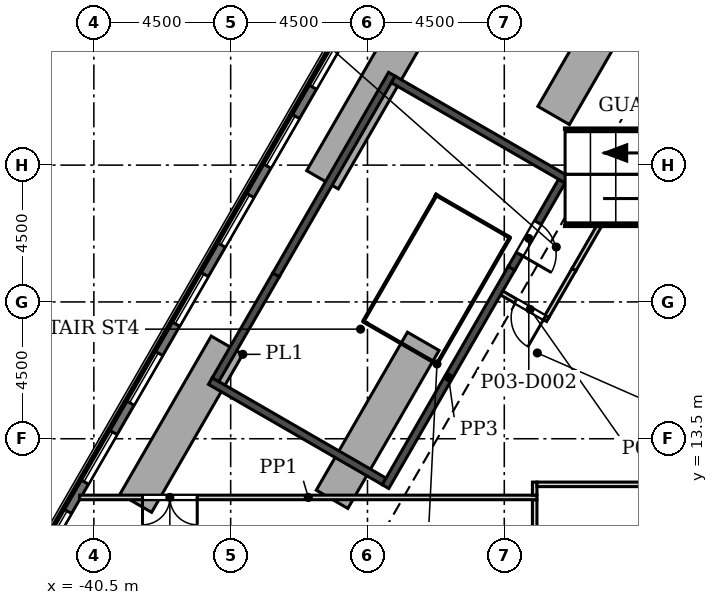
"""IFC4 building model, lengths in metres.
Left out: names, types, materials, properties, quantities, classifications, styles, units other than length and angle.
Written with IfcOpenShell. Run it as: python <this file> out.ifc"""

import sys

from ifc_helpers import new_model, si_unit, direction, frame, frame_2d, origin, place, context, subcontext, project, spatial, polyline, rectangle, outline, extrude, element, fill, save


model = new_model("IFC4")
c1 = context("Model", 3, precision=1e-05, world=origin(), true_north=direction((0.0, 1.0)))
c2 = subcontext(c1, "Body", "Model", "MODEL_VIEW")
j1 = project(units=[si_unit("LENGTHUNIT", "METRE"), si_unit("PLANEANGLEUNIT", "RADIAN")], contexts=[c1])
p1 = place(None, origin())
s1 = spatial("IfcSite", under=j1, at=p1, CompositionType="ELEMENT")
p2 = place(p1, origin())
s2 = spatial("IfcBuilding", under=s1, at=p2, CompositionType="ELEMENT")
p3 = place(p2, frame((0.0, 0.0, 20.0)))
s3 = spatial("IfcBuildingStorey", under=s2, at=p3, CompositionType="ELEMENT", Elevation=20.0)
p4 = place(p3, frame((-4.853, 74.393, 0.0), z_axis=(0.0, 0.0, 1.0), x_axis=(-0.49999894854, -0.866026010844, 0.0)))
e1 = element("IfcWall", 1, at=p4, inside=s3, PredefinedType="SOLIDWALL", context=c2, shape_type="SweptSolid", body=[
    extrude(rectangle(XDim=76.0, YDim=0.34, at=frame_2d((38.0, 0.0))), origin(), (0.0, 0.0, 1.0), 3.0),
])
p5 = place(p4, frame((1.058, 0.0, 0.9)))
e2 = element("IfcOpeningElement", 2, at=p5, cuts=e1, PredefinedType="OPENING", context=c2, shape_type="SweptSolid", body=[
    extrude(rectangle(XDim=1.885, YDim=1.9, at=frame_2d((0.942, 0.95))), frame((0.0, 0.18, 0.0), z_axis=(0.0, -1.0, 0.0), x_axis=(1.0, 0.0, 0.0)), (0.0, 0.0, 1.0), 0.36),
])
p6 = place(p4, frame((4.058, 0.0, 0.9)))
e3 = element("IfcOpeningElement", 3, at=p6, cuts=e1, PredefinedType="OPENING", context=c2, shape_type="SweptSolid", body=[
    extrude(rectangle(XDim=1.885, YDim=1.9, at=frame_2d((0.942, 0.95))), frame((0.0, 0.18, 0.0), z_axis=(0.0, -1.0, 0.0), x_axis=(1.0, 0.0, 0.0)), (0.0, 0.0, 1.0), 0.36),
])
p7 = place(p4, frame((7.058, 0.0, 0.9)))
e4 = element("IfcOpeningElement", 4, at=p7, cuts=e1, PredefinedType="OPENING", context=c2, shape_type="SweptSolid", body=[
    extrude(rectangle(XDim=1.885, YDim=1.9, at=frame_2d((0.942, 0.95))), frame((0.0, 0.18, 0.0), z_axis=(0.0, -1.0, 0.0), x_axis=(1.0, 0.0, 0.0)), (0.0, 0.0, 1.0), 0.36),
])
p8 = place(p4, frame((10.058, 0.0, 0.9)))
e5 = element("IfcOpeningElement", 5, at=p8, cuts=e1, PredefinedType="OPENING", context=c2, shape_type="SweptSolid", body=[
    extrude(rectangle(XDim=1.885, YDim=1.9, at=frame_2d((0.942, 0.95))), frame((0.0, 0.18, 0.0), z_axis=(0.0, -1.0, 0.0), x_axis=(1.0, 0.0, 0.0)), (0.0, 0.0, 1.0), 0.36),
])
p9 = place(p4, frame((13.058, 0.0, 0.9)))
e6 = element("IfcOpeningElement", 6, at=p9, cuts=e1, PredefinedType="OPENING", context=c2, shape_type="SweptSolid", body=[
    extrude(rectangle(XDim=1.885, YDim=1.9, at=frame_2d((0.942, 0.95))), frame((0.0, 0.18, 0.0), z_axis=(0.0, -1.0, 0.0), x_axis=(1.0, 0.0, 0.0)), (0.0, 0.0, 1.0), 0.36),
])
p10 = place(p4, frame((16.058, 0.0, 0.9)))
e7 = element("IfcOpeningElement", 7, at=p10, cuts=e1, PredefinedType="OPENING", context=c2, shape_type="SweptSolid", body=[
    extrude(rectangle(XDim=1.885, YDim=1.9, at=frame_2d((0.942, 0.95))), frame((0.0, 0.18, 0.0), z_axis=(0.0, -1.0, 0.0), x_axis=(1.0, 0.0, 0.0)), (0.0, 0.0, 1.0), 0.36),
])
p11 = place(p4, frame((19.058, 0.0, 0.9)))
e8 = element("IfcOpeningElement", 8, at=p11, cuts=e1, PredefinedType="OPENING", context=c2, shape_type="SweptSolid", body=[
    extrude(rectangle(XDim=1.885, YDim=1.9, at=frame_2d((0.942, 0.95))), frame((0.0, 0.18, 0.0), z_axis=(0.0, -1.0, 0.0), x_axis=(1.0, 0.0, 0.0)), (0.0, 0.0, 1.0), 0.36),
])
p12 = place(p4, frame((22.058, 0.0, 0.9)))
e9 = element("IfcOpeningElement", 9, at=p12, cuts=e1, PredefinedType="OPENING", context=c2, shape_type="SweptSolid", body=[
    extrude(rectangle(XDim=1.885, YDim=1.9, at=frame_2d((0.942, 0.95))), frame((0.0, 0.18, 0.0), z_axis=(0.0, -1.0, 0.0), x_axis=(1.0, 0.0, 0.0)), (0.0, 0.0, 1.0), 0.36),
])
p13 = place(p4, frame((25.058, 0.0, 0.9)))
e10 = element("IfcOpeningElement", 10, at=p13, cuts=e1, PredefinedType="OPENING", context=c2, shape_type="SweptSolid", body=[
    extrude(rectangle(XDim=1.885, YDim=1.9, at=frame_2d((0.942, 0.95))), frame((0.0, 0.18, 0.0), z_axis=(0.0, -1.0, 0.0), x_axis=(1.0, 0.0, 0.0)), (0.0, 0.0, 1.0), 0.36),
])
p14 = place(p4, frame((28.058, 0.0, 0.9)))
e11 = element("IfcOpeningElement", 11, at=p14, cuts=e1, PredefinedType="OPENING", context=c2, shape_type="SweptSolid", body=[
    extrude(rectangle(XDim=1.885, YDim=1.9, at=frame_2d((0.942, 0.95))), frame((0.0, 0.18, 0.0), z_axis=(0.0, -1.0, 0.0), x_axis=(1.0, 0.0, 0.0)), (0.0, 0.0, 1.0), 0.36),
])
p15 = place(p4, frame((31.058, 0.0, 0.9)))
e12 = element("IfcOpeningElement", 12, at=p15, cuts=e1, PredefinedType="OPENING", context=c2, shape_type="SweptSolid", body=[
    extrude(rectangle(XDim=1.885, YDim=1.9, at=frame_2d((0.942, 0.95))), frame((0.0, 0.18, 0.0), z_axis=(0.0, -1.0, 0.0), x_axis=(1.0, 0.0, 0.0)), (0.0, 0.0, 1.0), 0.36),
])
p16 = place(p4, frame((34.058, 0.0, 0.9)))
e13 = element("IfcOpeningElement", 13, at=p16, cuts=e1, PredefinedType="OPENING", context=c2, shape_type="SweptSolid", body=[
    extrude(rectangle(XDim=1.885, YDim=1.9, at=frame_2d((0.942, 0.95))), frame((0.0, 0.18, 0.0), z_axis=(0.0, -1.0, 0.0), x_axis=(1.0, 0.0, 0.0)), (0.0, 0.0, 1.0), 0.36),
])
p17 = place(p4, frame((37.058, 0.0, 0.9)))
e14 = element("IfcOpeningElement", 14, at=p17, cuts=e1, PredefinedType="OPENING", context=c2, shape_type="SweptSolid", body=[
    extrude(rectangle(XDim=1.885, YDim=1.9, at=frame_2d((0.942, 0.95))), frame((0.0, 0.18, 0.0), z_axis=(0.0, -1.0, 0.0), x_axis=(1.0, 0.0, 0.0)), (0.0, 0.0, 1.0), 0.36),
])
p18 = place(p4, frame((40.058, 0.0, 0.9)))
e15 = element("IfcOpeningElement", 15, at=p18, cuts=e1, PredefinedType="OPENING", context=c2, shape_type="SweptSolid", body=[
    extrude(rectangle(XDim=1.885, YDim=1.9, at=frame_2d((0.942, 0.95))), frame((0.0, 0.18, 0.0), z_axis=(0.0, -1.0, 0.0), x_axis=(1.0, 0.0, 0.0)), (0.0, 0.0, 1.0), 0.36),
])
p19 = place(p4, frame((43.058, 0.0, 0.9)))
e16 = element("IfcOpeningElement", 16, at=p19, cuts=e1, PredefinedType="OPENING", context=c2, shape_type="SweptSolid", body=[
    extrude(rectangle(XDim=1.885, YDim=1.9, at=frame_2d((0.942, 0.95))), frame((0.0, 0.18, 0.0), z_axis=(0.0, -1.0, 0.0), x_axis=(1.0, 0.0, 0.0)), (0.0, 0.0, 1.0), 0.36),
])
p20 = place(p4, frame((46.058, 0.0, 0.9)))
e17 = element("IfcOpeningElement", 17, at=p20, cuts=e1, PredefinedType="OPENING", context=c2, shape_type="SweptSolid", body=[
    extrude(rectangle(XDim=1.885, YDim=1.9, at=frame_2d((0.942, 0.95))), frame((0.0, 0.18, 0.0), z_axis=(0.0, -1.0, 0.0), x_axis=(1.0, 0.0, 0.0)), (0.0, 0.0, 1.0), 0.36),
])
p21 = place(p4, frame((49.058, 0.0, 0.9)))
e18 = element("IfcOpeningElement", 18, at=p21, cuts=e1, PredefinedType="OPENING", context=c2, shape_type="SweptSolid", body=[
    extrude(rectangle(XDim=1.885, YDim=1.9, at=frame_2d((0.942, 0.95))), frame((0.0, 0.18, 0.0), z_axis=(0.0, -1.0, 0.0), x_axis=(1.0, 0.0, 0.0)), (0.0, 0.0, 1.0), 0.36),
])
p22 = place(p4, frame((52.058, 0.0, 0.9)))
e19 = element("IfcOpeningElement", 19, at=p22, cuts=e1, PredefinedType="OPENING", context=c2, shape_type="SweptSolid", body=[
    extrude(rectangle(XDim=1.885, YDim=1.9, at=frame_2d((0.942, 0.95))), frame((0.0, 0.18, 0.0), z_axis=(0.0, -1.0, 0.0), x_axis=(1.0, 0.0, 0.0)), (0.0, 0.0, 1.0), 0.36),
])
p23 = place(p4, frame((55.058, 0.0, 0.9)))
e20 = element("IfcOpeningElement", 20, at=p23, cuts=e1, PredefinedType="OPENING", context=c2, shape_type="SweptSolid", body=[
    extrude(rectangle(XDim=1.885, YDim=1.9, at=frame_2d((0.942, 0.95))), frame((0.0, 0.18, 0.0), z_axis=(0.0, -1.0, 0.0), x_axis=(1.0, 0.0, 0.0)), (0.0, 0.0, 1.0), 0.36),
])
p24 = place(p4, frame((58.058, 0.0, 0.9)))
e21 = element("IfcOpeningElement", 21, at=p24, cuts=e1, PredefinedType="OPENING", context=c2, shape_type="SweptSolid", body=[
    extrude(rectangle(XDim=1.885, YDim=1.9, at=frame_2d((0.942, 0.95))), frame((0.0, 0.18, 0.0), z_axis=(0.0, -1.0, 0.0), x_axis=(1.0, 0.0, 0.0)), (0.0, 0.0, 1.0), 0.36),
])
p25 = place(p4, frame((61.058, 0.0, 0.9)))
e22 = element("IfcOpeningElement", 22, at=p25, cuts=e1, PredefinedType="OPENING", context=c2, shape_type="SweptSolid", body=[
    extrude(rectangle(XDim=1.885, YDim=1.9, at=frame_2d((0.942, 0.95))), frame((0.0, 0.18, 0.0), z_axis=(0.0, -1.0, 0.0), x_axis=(1.0, 0.0, 0.0)), (0.0, 0.0, 1.0), 0.36),
])
p26 = place(p4, frame((64.058, 0.0, 0.9)))
e23 = element("IfcOpeningElement", 23, at=p26, cuts=e1, PredefinedType="OPENING", context=c2, shape_type="SweptSolid", body=[
    extrude(rectangle(XDim=1.885, YDim=1.9, at=frame_2d((0.942, 0.95))), frame((0.0, 0.18, 0.0), z_axis=(0.0, -1.0, 0.0), x_axis=(1.0, 0.0, 0.0)), (0.0, 0.0, 1.0), 0.36),
])
p27 = place(p4, frame((67.058, 0.0, 0.9)))
e24 = element("IfcOpeningElement", 24, at=p27, cuts=e1, PredefinedType="OPENING", context=c2, shape_type="SweptSolid", body=[
    extrude(rectangle(XDim=1.885, YDim=1.9, at=frame_2d((0.942, 0.95))), frame((0.0, 0.18, 0.0), z_axis=(0.0, -1.0, 0.0), x_axis=(1.0, 0.0, 0.0)), (0.0, 0.0, 1.0), 0.36),
])
p28 = place(p4, frame((70.058, 0.0, 0.9)))
e25 = element("IfcOpeningElement", 25, at=p28, cuts=e1, PredefinedType="OPENING", context=c2, shape_type="SweptSolid", body=[
    extrude(rectangle(XDim=1.885, YDim=1.9, at=frame_2d((0.942, 0.95))), frame((0.0, 0.18, 0.0), z_axis=(0.0, -1.0, 0.0), x_axis=(1.0, 0.0, 0.0)), (0.0, 0.0, 1.0), 0.36),
])
p29 = place(p4, frame((73.058, 0.0, 0.9)))
e26 = element("IfcOpeningElement", 26, at=p29, cuts=e1, PredefinedType="OPENING", context=c2, shape_type="SweptSolid", body=[
    extrude(rectangle(XDim=1.885, YDim=1.9, at=frame_2d((0.942, 0.95))), frame((0.0, 0.18, 0.0), z_axis=(0.0, -1.0, 0.0), x_axis=(1.0, 0.0, 0.0)), (0.0, 0.0, 1.0), 0.36),
])
p30 = place(p3, frame((0.0, 0.0, 5.0)))
e27 = element("IfcWall", 27, at=p30, inside=s3, PredefinedType="USERDEFINED", context=c2, shape_type="SweptSolid", body=[
    extrude(outline(polyline([(-39.64, 11.68), (-38.601, 11.08), (-35.601, 16.277), (-36.64, 16.876), (-39.64, 11.68)])), origin(), (0.0, 0.0, 1.0), 1.1),
])
p31 = place(p3, frame((0.0, 0.0, 5.0)))
e28 = element("IfcWall", 28, at=p31, inside=s3, PredefinedType="USERDEFINED", context=c2, shape_type="SweptSolid", body=[
    extrude(outline(polyline([(-33.499, 22.317), (-32.46, 21.717), (-29.46, 26.913), (-30.499, 27.513), (-33.499, 22.317)])), origin(), (0.0, 0.0, 1.0), 1.1),
])
p32 = place(p3, frame((0.0, 0.0, 5.0)))
e29 = element("IfcWall", 29, at=p32, inside=s3, PredefinedType="USERDEFINED", context=c2, shape_type="SweptSolid", body=[
    extrude(outline(polyline([(-21.857, 29.029), (-22.896, 29.629), (-25.896, 24.433), (-24.857, 23.833), (-21.857, 29.029)])), origin(), (0.0, 0.0, 1.0), 1.1),
])
p33 = place(p3, frame((0.0, 0.0, 5.0)))
e30 = element("IfcWall", 30, at=p33, inside=s3, PredefinedType="USERDEFINED", context=c2, shape_type="SweptSolid", body=[
    extrude(outline(polyline([(-29.146, 16.405), (-30.185, 17.004), (-33.185, 11.808), (-32.146, 11.208), (-29.146, 16.405)])), origin(), (0.0, 0.0, 1.0), 1.1),
])
p34 = place(p3, frame((-26.0, 11.495, 0.0), z_axis=(0.0, 0.0, 1.0), x_axis=(0.0, -1.0, 0.0)))
e31 = element("IfcWall", 31, at=p34, inside=s3, PredefinedType="PARTITIONING", context=c2, shape_type="SweptSolid", body=[
    extrude(rectangle(XDim=1.42, YDim=0.15, at=frame_2d((0.71, 0.0))), origin(), (0.0, 0.0, 1.0), 3.0),
])
p35 = place(p3, frame((-40.968, 11.57, 0.0), z_axis=(0.0, 0.0, 1.0), x_axis=(1.0, 0.0, 0.0)))
e32 = element("IfcWall", 32, at=p35, inside=s3, PredefinedType="PARTITIONING", context=c2, shape_type="SweptSolid", body=[
    extrude(rectangle(XDim=15.043, YDim=0.15, at=frame_2d((7.521, 0.0))), origin(), (0.0, 0.0, 1.0), 3.0),
])
p36 = place(p35, frame((2.068, 0.0, 0.0)))
e33 = element("IfcOpeningElement", 33, at=p36, cuts=e32, PredefinedType="OPENING", context=c2, shape_type="SweptSolid", body=[
    extrude(rectangle(XDim=1.8, YDim=2.1, at=frame_2d((0.9, 1.05))), frame((0.0, 0.085, 0.0), z_axis=(0.0, -1.0, 0.0), x_axis=(1.0, 0.0, 0.0)), (0.0, 0.0, 1.0), 0.17),
])
p37 = place(p3, frame((-26.0, 11.645, 0.0), z_axis=(0.0, 0.0, 1.0), x_axis=(0.0, 1.0, 0.0)))
e34 = element("IfcWall", 34, at=p37, inside=s3, PredefinedType="PARTITIONING", context=c2, shape_type="SweptSolid", body=[
    extrude(rectangle(XDim=0.43, YDim=0.15, at=frame_2d((0.215, 0.0))), origin(), (0.0, 0.0, 1.0), 3.0),
])
p38 = place(p3, frame((-25.925, 12.0, 0.0), z_axis=(0.0, 0.0, 1.0), x_axis=(1.0, 0.0, 0.0)))
e35 = element("IfcWall", 35, at=p38, inside=s3, PredefinedType="PARTITIONING", context=c2, shape_type="SweptSolid", body=[
    extrude(rectangle(XDim=12.512, YDim=0.15, at=frame_2d((6.256, 0.0))), origin(), (0.0, 0.0, 1.0), 3.0),
])
p39 = place(p38, frame((5.025, 0.0, 0.0)))
e36 = element("IfcOpeningElement", 36, at=p39, cuts=e35, PredefinedType="OPENING", context=c2, shape_type="SweptSolid", body=[
    extrude(rectangle(XDim=1.8, YDim=2.1, at=frame_2d((0.9, 1.05))), frame((0.0, 0.085, 0.0), z_axis=(0.0, -1.0, 0.0), x_axis=(1.0, 0.0, 0.0)), (0.0, 0.0, 1.0), 0.17),
])
p40 = place(p3, frame((-30.953, 12.097, 0.0), z_axis=(0.0, 0.0, 1.0), x_axis=(-0.866040211805, 0.499974350878, 0.0)))
e37 = element("IfcWall", 37, at=p40, inside=s3, PredefinedType="SOLIDWALL", context=c2, shape_type="SweptSolid", body=[
    extrude(rectangle(XDim=6.6, YDim=0.25, at=frame_2d((3.3, 0.0))), origin(), (0.0, 0.0, 1.0), 3.0),
])
p41 = place(p3, frame((-36.498, 15.443, 0.0), z_axis=(0.0, 0.0, 1.0), x_axis=(0.499989551455, 0.866031436171, 0.0)))
e38 = element("IfcWall", 38, at=p41, inside=s3, PredefinedType="SOLIDWALL", context=c2, shape_type="SweptSolid", body=[
    extrude(rectangle(XDim=3.982, YDim=0.25, at=frame_2d((1.991, 0.0))), origin(), (0.0, 0.0, 1.0), 3.0),
])
p42 = place(p3, frame((-25.571, 17.419, 0.0), z_axis=(0.0, 0.0, 1.0), x_axis=(-0.866046247233, 0.49996389635, 0.0)))
e39 = element("IfcWall", 39, at=p42, inside=s3, PredefinedType="PARTITIONING", context=c2, shape_type="SweptSolid", body=[
    extrude(rectangle(XDim=1.751, YDim=0.15, at=frame_2d((0.875, 0.0))), origin(), (0.0, 0.0, 1.0), 3.0),
])
p43 = place(p42, frame((0.12, 0.0, 0.0)))
e40 = element("IfcOpeningElement", 40, at=p43, cuts=e39, PredefinedType="OPENING", context=c2, shape_type="SweptSolid", body=[
    extrude(rectangle(XDim=1.1, YDim=2.1, at=frame_2d((0.55, 1.05))), frame((0.0, 0.085, 0.0), z_axis=(0.0, -1.0, 0.0), x_axis=(1.0, 0.0, 0.0)), (0.0, 0.0, 1.0), 0.17),
])
p44 = place(p3, frame((-34.507, 18.892, 0.0), z_axis=(0.0, 0.0, 1.0), x_axis=(0.499958264338, 0.866049498539, 0.0)))
e41 = element("IfcWall", 41, at=p44, inside=s3, PredefinedType="SOLIDWALL", context=c2, shape_type="SweptSolid", body=[
    extrude(rectangle(XDim=7.618, YDim=0.25, at=frame_2d((3.809, 0.0))), origin(), (0.0, 0.0, 1.0), 3.0),
])
p45 = place(p3, frame((-24.707, 19.065, 0.0), z_axis=(0.0, 0.0, 1.0), x_axis=(-0.500058459303, -0.865991649659, 0.0)))
e42 = element("IfcWall", 42, at=p45, inside=s3, PredefinedType="PARTITIONING", context=c2, shape_type="SweptSolid", body=[
    extrude(rectangle(XDim=1.782, YDim=0.15, at=frame_2d((0.891, 0.0))), origin(), (0.0, 0.0, 1.0), 3.0),
])
p46 = place(p3, frame((-26.761, 19.108, 0.0), z_axis=(0.0, 0.0, 1.0), x_axis=(-0.499979843709, -0.866037040711, 0.0)))
e43 = element("IfcWall", 43, at=p46, inside=s3, PredefinedType="SOLIDWALL", context=c2, shape_type="SweptSolid", body=[
    extrude(rectangle(XDim=8.293, YDim=0.25, at=frame_2d((4.146, 0.0))), origin(), (0.0, 0.0, 1.0), 3.0),
])
p47 = place(p3, frame((-23.841, 20.565, 0.0), z_axis=(0.0, 0.0, 1.0), x_axis=(-0.500019299785, -0.866014260761, 0.0)))
e44 = element("IfcWall", 44, at=p47, inside=s3, PredefinedType="PARTITIONING", context=c2, shape_type="SweptSolid", body=[
    extrude(rectangle(XDim=1.732, YDim=0.15, at=frame_2d((0.866, 0.0))), origin(), (0.0, 0.0, 1.0), 3.0),
])
p48 = place(p3, frame((-25.107, 21.972, 0.0), z_axis=(0.0, 0.0, 1.0), x_axis=(-0.500005757777, -0.866022079505, 0.0)))
e45 = element("IfcWall", 45, at=p48, inside=s3, PredefinedType="SOLIDWALL", context=c2, shape_type="SweptSolid", body=[
    extrude(rectangle(XDim=3.307, YDim=0.25, at=frame_2d((1.654, 0.0))), origin(), (0.0, 0.0, 1.0), 3.0),
])
p49 = place(p48, frame((1.575, 0.0, 0.0)))
e46 = element("IfcOpeningElement", 46, at=p49, cuts=e45, PredefinedType="OPENING", context=c2, shape_type="SweptSolid", body=[
    extrude(rectangle(XDim=1.2, YDim=2.1, at=frame_2d((0.6, 1.05))), frame((0.0, 0.135, 0.0), z_axis=(0.0, -1.0, 0.0), x_axis=(1.0, 0.0, 0.0)), (0.0, 0.0, 1.0), 0.27),
])
p50 = place(p3, frame((-30.652, 25.318, 0.0), z_axis=(0.0, 0.0, 1.0), x_axis=(0.866040211805, -0.499974350878, 0.0)))
e47 = element("IfcWall", 47, at=p50, inside=s3, PredefinedType="SOLIDWALL", context=c2, shape_type="SweptSolid", body=[
    extrude(rectangle(XDim=6.6, YDim=0.25, at=frame_2d((3.3, 0.0))), origin(), (0.0, 0.0, 1.0), 3.0),
])
p51 = place(p23, origin())
e48 = element("IfcWindow", 48, at=p51, inside=s3, PartitioningType="SINGLE_PANEL", PredefinedType="WINDOW", context=c2, shape_type="SweptSolid", body=[
    extrude(rectangle(XDim=1.885, YDim=1.9, at=frame_2d((0.942, 0.95))), frame((0.0, 0.11, 0.0), z_axis=(0.0, -1.0, 0.0), x_axis=(1.0, 0.0, 0.0)), (0.0, 0.0, 1.0), 0.06),
])
fill(e20, e48)
p52 = place(p24, origin())
e49 = element("IfcWindow", 49, at=p52, inside=s3, PartitioningType="SINGLE_PANEL", PredefinedType="WINDOW", context=c2, shape_type="SweptSolid", body=[
    extrude(rectangle(XDim=1.885, YDim=1.9, at=frame_2d((0.942, 0.95))), frame((0.0, 0.11, 0.0), z_axis=(0.0, -1.0, 0.0), x_axis=(1.0, 0.0, 0.0)), (0.0, 0.0, 1.0), 0.06),
])
fill(e21, e49)
p53 = place(p25, origin())
e50 = element("IfcWindow", 50, at=p53, inside=s3, PartitioningType="SINGLE_PANEL", PredefinedType="WINDOW", context=c2, shape_type="SweptSolid", body=[
    extrude(rectangle(XDim=1.885, YDim=1.9, at=frame_2d((0.942, 0.95))), frame((0.0, 0.11, 0.0), z_axis=(0.0, -1.0, 0.0), x_axis=(1.0, 0.0, 0.0)), (0.0, 0.0, 1.0), 0.06),
])
fill(e22, e50)
p54 = place(p26, origin())
e51 = element("IfcWindow", 51, at=p54, inside=s3, PartitioningType="SINGLE_PANEL", PredefinedType="WINDOW", context=c2, shape_type="SweptSolid", body=[
    extrude(rectangle(XDim=1.885, YDim=1.9, at=frame_2d((0.942, 0.95))), frame((0.0, 0.11, 0.0), z_axis=(0.0, -1.0, 0.0), x_axis=(1.0, 0.0, 0.0)), (0.0, 0.0, 1.0), 0.06),
])
fill(e23, e51)
p55 = place(p27, origin())
e52 = element("IfcWindow", 52, at=p55, inside=s3, PartitioningType="SINGLE_PANEL", PredefinedType="WINDOW", context=c2, shape_type="SweptSolid", body=[
    extrude(rectangle(XDim=1.885, YDim=1.9, at=frame_2d((0.942, 0.95))), frame((0.0, 0.11, 0.0), z_axis=(0.0, -1.0, 0.0), x_axis=(1.0, 0.0, 0.0)), (0.0, 0.0, 1.0), 0.06),
])
fill(e24, e52)
p56 = place(p28, origin())
e53 = element("IfcWindow", 53, at=p56, inside=s3, PartitioningType="SINGLE_PANEL", PredefinedType="WINDOW", context=c2, shape_type="SweptSolid", body=[
    extrude(rectangle(XDim=1.885, YDim=1.9, at=frame_2d((0.942, 0.95))), frame((0.0, 0.11, 0.0), z_axis=(0.0, -1.0, 0.0), x_axis=(1.0, 0.0, 0.0)), (0.0, 0.0, 1.0), 0.06),
])
fill(e25, e53)
p57 = place(p29, origin())
e54 = element("IfcWindow", 54, at=p57, inside=s3, PartitioningType="SINGLE_PANEL", PredefinedType="WINDOW", context=c2, shape_type="SweptSolid", body=[
    extrude(rectangle(XDim=1.885, YDim=1.9, at=frame_2d((0.942, 0.95))), frame((0.0, 0.11, 0.0), z_axis=(0.0, -1.0, 0.0), x_axis=(1.0, 0.0, 0.0)), (0.0, 0.0, 1.0), 0.06),
])
fill(e26, e54)
p58 = place(p49, origin())
e55 = element("IfcDoor", 55, at=p58, inside=s3, OperationType="SINGLE_SWING_RIGHT", PredefinedType="DOOR", context=c2, shape_type="SweptSolid", body=[
    extrude(rectangle(XDim=1.2, YDim=2.1, at=frame_2d((0.6, 1.05))), frame((0.0, 0.025, 0.0), z_axis=(0.0, -1.0, 0.0), x_axis=(1.0, 0.0, 0.0)), (0.0, 0.0, 1.0), 0.05),
])
fill(e46, e55)
p59 = place(p43, origin())
e56 = element("IfcDoor", 56, at=p59, inside=s3, OperationType="SINGLE_SWING_LEFT", PredefinedType="DOOR", context=c2, shape_type="SweptSolid", body=[
    extrude(rectangle(XDim=1.1, YDim=2.1, at=frame_2d((0.55, 1.05))), frame((0.0, 0.025, 0.0), z_axis=(0.0, -1.0, 0.0), x_axis=(1.0, 0.0, 0.0)), (0.0, 0.0, 1.0), 0.05),
])
fill(e40, e56)
p60 = place(p36, frame((1.8, 0.0, 0.0), z_axis=(0.0, 0.0, 1.0), x_axis=(-1.0, 0.0, 0.0)))
e57 = element("IfcDoor", 57, at=p60, inside=s3, OperationType="DOUBLE_DOOR_SINGLE_SWING", PredefinedType="DOOR", context=c2, shape_type="SweptSolid", body=[
    extrude(rectangle(XDim=1.8, YDim=2.1, at=frame_2d((0.9, 1.05))), frame((0.0, 0.025, 0.0), z_axis=(0.0, -1.0, 0.0), x_axis=(1.0, 0.0, 0.0)), (0.0, 0.0, 1.0), 0.05),
])
fill(e33, e57)
save(model, sys.argv[1])
